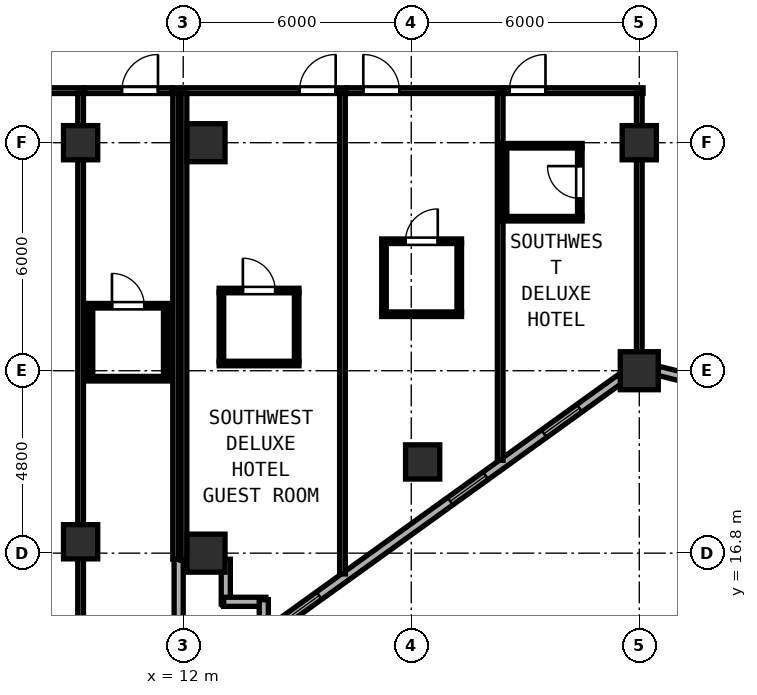
"""IFC4 building model, lengths in metres.
Left out: names, types, materials, properties, quantities, classifications, styles, units other than length and angle.
Written with IfcOpenShell. Run it as: python <this file> out.ifc"""

import sys

from ifc_helpers import new_model, si_unit, direction, frame, frame_2d, origin, origin_2d, place, context, subcontext, project, spatial, rectangle, hollow_rectangle, extrude, element, fill, save


model = new_model("IFC4")
c1 = context("Model", 3, precision=1e-05, world=origin(), true_north=direction((0.0, 1.0)))
c2 = subcontext(c1, "Body", "Model", "MODEL_VIEW")
j1 = project(units=[si_unit("LENGTHUNIT", "METRE"), si_unit("PLANEANGLEUNIT", "RADIAN")], contexts=[c1])
p1 = place(None, origin())
s1 = spatial("IfcSite", under=j1, at=p1, CompositionType="ELEMENT")
p2 = place(p1, origin())
s2 = spatial("IfcBuilding", under=s1, at=p2, CompositionType="ELEMENT")
p3 = place(p2, frame((0.0, 0.0, 152.4)))
s3 = spatial("IfcBuildingStorey", under=s2, at=p3, CompositionType="ELEMENT", Elevation=152.4)
for number, where, z_axis, x_axis in (
    (1, (24.0, 21.6, 0.0), (0.0, 0.0, 1.0), (1.0, 0.0, 0.0)),
    (2, (12.6, 16.8, 0.0), (0.0, 0.0, 1.0), (1.0, 0.0, 0.0)),
    (3, (12.6, 27.6, 0.0), (0.0, 0.0, 1.0), (1.0, 0.0, 0.0)),
):
    element("IfcColumn", number, at=place(p3, frame(where, z_axis=z_axis, x_axis=x_axis)), inside=s3, PredefinedType="COLUMN", context=c2, shape_type="SweptSolid", body=[
        extrude(hollow_rectangle(XDim=1.0, YDim=1.0, WallThickness=0.038, at=origin_2d()), origin(), (0.0, 0.0, 1.0), 3.8),
    ])
for number, where, z_axis, x_axis in (
    (4, (24.0, 27.6, 0.0), (0.0, 0.0, 1.0), (1.0, 0.0, 0.0)),
    (5, (18.3, 19.2, 0.0), (0.0, 0.0, 1.0), (1.0, 0.0, 0.0)),
    (6, (9.3, 17.1, 0.0), (0.0, 0.0, 1.0), (1.0, 0.0, 0.0)),
    (7, (9.3, 27.6, 0.0), (0.0, 0.0, 1.0), (1.0, 0.0, 0.0)),
):
    element("IfcColumn", number, at=place(p3, frame(where, z_axis=z_axis, x_axis=x_axis)), inside=s3, PredefinedType="COLUMN", context=c2, shape_type="SweptSolid", body=[
        extrude(hollow_rectangle(XDim=0.9, YDim=0.9, WallThickness=0.034, at=origin_2d()), origin(), (0.0, 0.0, 1.0), 3.8),
    ])
p4 = place(p3, frame((13.12, 16.64, 0.0), z_axis=(0.0, 0.0, 1.0), x_axis=(0.0, -1.0, 0.0)))
e8 = element("IfcWall", 8, at=p4, inside=s3, PredefinedType="SOLIDWALL", context=c2, shape_type="SweptSolid", body=[
    extrude(rectangle(XDim=1.175, YDim=0.24, at=frame_2d((0.587, 0.0))), origin(), (0.0, 0.0, 1.0), 3.6),
])
p5 = place(p3, frame((13.065, 15.52, 0.0), z_axis=(0.0, 0.0, 1.0), x_axis=(1.0, 0.0, 0.0)))
e9 = element("IfcWall", 9, at=p5, inside=s3, PredefinedType="SOLIDWALL", context=c2, shape_type="SweptSolid", body=[
    extrude(rectangle(XDim=1.11, YDim=0.24, at=frame_2d((0.555, 0.0))), origin(), (0.0, 0.0, 1.0), 3.6),
])
p6 = place(p3, frame((14.12, 15.575, 0.0), z_axis=(0.0, 0.0, 1.0), x_axis=(0.0, -1.0, 0.0)))
e10 = element("IfcWall", 10, at=p6, inside=s3, PredefinedType="SOLIDWALL", context=c2, shape_type="SweptSolid", body=[
    extrude(rectangle(XDim=0.996, YDim=0.24, at=frame_2d((0.498, 0.0))), origin(), (0.0, 0.0, 1.0), 3.6),
])
p7 = place(p3, frame((14.075, 14.602, 0.0), z_axis=(0.0, 0.0, 1.0), x_axis=(0.811543504691, 0.584291998913, 0.0)))
e11 = element("IfcWall", 11, at=p7, inside=s3, PredefinedType="SOLIDWALL", context=c2, shape_type="SweptSolid", body=[
    extrude(rectangle(XDim=11.623, YDim=0.24, at=frame_2d((5.812, 0.0))), origin(), (0.0, 0.0, 1.0), 3.145),
])
p8 = place(p7, frame((0.7, 0.0, 0.85)))
e12 = element("IfcOpeningElement", 12, at=p8, cuts=e11, PredefinedType="OPENING", context=c2, shape_type="SweptSolid", body=[
    extrude(rectangle(XDim=1.15, YDim=1.8, at=frame_2d((0.575, 0.9))), frame((0.0, 0.13, 0.0), z_axis=(0.0, -1.0, 0.0), x_axis=(1.0, 0.0, 0.0)), (0.0, 0.0, 1.0), 0.26),
])
p9 = place(p7, frame((6.1, 0.0, 0.85)))
e13 = element("IfcOpeningElement", 13, at=p9, cuts=e11, PredefinedType="OPENING", context=c2, shape_type="SweptSolid", body=[
    extrude(rectangle(XDim=1.15, YDim=1.8, at=frame_2d((0.575, 0.9))), frame((0.0, 0.13, 0.0), z_axis=(0.0, -1.0, 0.0), x_axis=(1.0, 0.0, 0.0)), (0.0, 0.0, 1.0), 0.26),
])
p10 = place(p7, frame((9.141, 0.0, 0.85)))
e14 = element("IfcOpeningElement", 14, at=p10, cuts=e11, PredefinedType="OPENING", context=c2, shape_type="SweptSolid", body=[
    extrude(rectangle(XDim=1.15, YDim=1.8, at=frame_2d((0.575, 0.9))), frame((0.0, 0.13, 0.0), z_axis=(0.0, -1.0, 0.0), x_axis=(1.0, 0.0, 0.0)), (0.0, 0.0, 1.0), 0.26),
])
p11 = place(p3, frame((24.492, 21.601, 0.0), z_axis=(0.0, 0.0, 1.0), x_axis=(0.970145683738, -0.242522890311, 0.0)))
e15 = element("IfcWall", 15, at=p11, inside=s3, PredefinedType="SOLIDWALL", context=c2, shape_type="SweptSolid", body=[
    extrude(rectangle(XDim=4.511, YDim=0.24, at=frame_2d((2.255, 0.0))), origin(), (0.0, 0.0, 1.0), 3.145),
])
p12 = place(p11, frame((0.7, 0.0, 0.85)))
e16 = element("IfcOpeningElement", 16, at=p12, cuts=e15, PredefinedType="OPENING", context=c2, shape_type="SweptSolid", body=[
    extrude(rectangle(XDim=1.15, YDim=1.8, at=frame_2d((0.575, 0.9))), frame((0.0, 0.13, 0.0), z_axis=(0.0, -1.0, 0.0), x_axis=(1.0, 0.0, 0.0)), (0.0, 0.0, 1.0), 0.26),
])
p13 = place(p3, frame((11.88, 14.397, 0.0), z_axis=(0.0, 0.0, 1.0), x_axis=(0.0, 1.0, 0.0)))
e17 = element("IfcWall", 17, at=p13, inside=s3, PredefinedType="SOLIDWALL", context=c2, shape_type="SweptSolid", body=[
    extrude(rectangle(XDim=2.243, YDim=0.24, at=frame_2d((1.121, 0.0))), origin(), (0.0, 0.0, 1.0), 3.6),
])
p14 = place(p3, frame((11.7, 28.97, 0.0), z_axis=(0.0, 0.0, 1.0), x_axis=(1.0, 0.0, 0.0)))
e18 = element("IfcWall", 18, at=p14, inside=s3, PredefinedType="PARTITIONING", context=c2, shape_type="SweptSolid", body=[
    extrude(rectangle(XDim=4.59, YDim=0.15, at=frame_2d((2.295, 0.0))), origin(), (0.0, 0.0, 1.0), 3.6),
])
p15 = place(p14, frame((4.311, 0.0, 0.0), z_axis=(0.0, 0.0, 1.0), x_axis=(-1.0, 0.0, 0.0)))
e19 = element("IfcOpeningElement", 19, at=p15, cuts=e18, PredefinedType="OPENING", context=c2, shape_type="SweptSolid", body=[
    extrude(rectangle(XDim=0.95, YDim=2.15, at=frame_2d((0.475, 1.075))), frame((0.0, 0.085, 0.0), z_axis=(0.0, -1.0, 0.0), x_axis=(1.0, 0.0, 0.0)), (0.0, 0.0, 1.0), 0.17),
])
p16 = place(p3, frame((11.8, 16.642, 0.0), z_axis=(0.0, 0.0, 1.0), x_axis=(0.0, 1.0, 0.0)))
e20 = element("IfcWall", 20, at=p16, inside=s3, PredefinedType="PARTITIONING", context=c2, shape_type="SweptSolid", body=[
    extrude(rectangle(XDim=12.268, YDim=0.15, at=frame_2d((6.134, 0.0))), origin(), (0.0, 0.0, 1.0), 3.6),
])
p17 = place(p3, frame((16.19, 16.254, 0.0), z_axis=(0.0, 0.0, 1.0), x_axis=(0.0, 1.0, 0.0)))
e21 = element("IfcWall", 21, at=p17, inside=s3, PredefinedType="PARTITIONING", context=c2, shape_type="SweptSolid", body=[
    extrude(rectangle(XDim=12.656, YDim=0.15, at=frame_2d((6.328, 0.0))), origin(), (0.0, 0.0, 1.0), 3.6),
])
p18 = place(p3, frame((12.945, 23.71, 0.0), z_axis=(0.0, 0.0, 1.0), x_axis=(1.0, 0.0, 0.0)))
e22 = element("IfcWall", 22, at=p18, inside=s3, PredefinedType="PARTITIONING", context=c2, shape_type="SweptSolid", body=[
    extrude(rectangle(XDim=2.1, YDim=0.12, at=frame_2d((1.05, 0.0))), origin(), (0.0, 0.0, 1.0), 3.6),
])
p19 = place(p18, frame((1.475, 0.0, 0.0), z_axis=(0.0, 0.0, 1.0), x_axis=(-1.0, 0.0, 0.0)))
e23 = element("IfcOpeningElement", 23, at=p19, cuts=e22, PredefinedType="OPENING", context=c2, shape_type="SweptSolid", body=[
    extrude(rectangle(XDim=0.85, YDim=2.1, at=frame_2d((0.425, 1.05))), frame((0.0, 0.07, 0.0), z_axis=(0.0, -1.0, 0.0), x_axis=(1.0, 0.0, 0.0)), (0.0, 0.0, 1.0), 0.14),
])
p20 = place(p3, frame((12.945, 21.79, 0.0), z_axis=(0.0, 0.0, 1.0), x_axis=(1.0, 0.0, 0.0)))
e24 = element("IfcWall", 24, at=p20, inside=s3, PredefinedType="PARTITIONING", context=c2, shape_type="SweptSolid", body=[
    extrude(rectangle(XDim=2.1, YDim=0.12, at=frame_2d((1.05, 0.0))), origin(), (0.0, 0.0, 1.0), 3.6),
])
for number, where, z_axis, x_axis in (
    (25, (13.005, 21.835, 0.0), (0.0, 0.0, 1.0), (0.0, 1.0, 0.0)),
    (26, (14.985, 21.835, 0.0), (0.0, 0.0, 1.0), (0.0, 1.0, 0.0)),
):
    element("IfcWall", number, at=place(p3, frame(where, z_axis=z_axis, x_axis=x_axis)), inside=s3, PredefinedType="PARTITIONING", context=c2, shape_type="SweptSolid", body=[
        extrude(rectangle(XDim=1.83, YDim=0.12, at=frame_2d((0.915, 0.0))), origin(), (0.0, 0.0, 1.0), 3.6),
    ])
p21 = place(p3, frame((16.292, 28.97, 0.0), z_axis=(0.0, 0.0, 1.0), x_axis=(1.0, 0.0, 0.0)))
e27 = element("IfcWall", 27, at=p21, inside=s3, PredefinedType="PARTITIONING", context=c2, shape_type="SweptSolid", body=[
    extrude(rectangle(XDim=4.148, YDim=0.15, at=frame_2d((2.074, 0.0))), origin(), (0.0, 0.0, 1.0), 3.6),
])
p22 = place(p21, frame((1.396, 0.0, 0.0), z_axis=(0.0, 0.0, 1.0), x_axis=(-1.0, 0.0, 0.0)))
e28 = element("IfcOpeningElement", 28, at=p22, cuts=e27, PredefinedType="OPENING", context=c2, shape_type="SweptSolid", body=[
    extrude(rectangle(XDim=0.95, YDim=2.15, at=frame_2d((0.475, 1.075))), frame((0.0, 0.085, 0.0), z_axis=(0.0, -1.0, 0.0), x_axis=(1.0, 0.0, 0.0)), (0.0, 0.0, 1.0), 0.17),
])
p23 = place(p3, frame((20.34, 19.242, 0.0), z_axis=(0.0, 0.0, 1.0), x_axis=(0.0, 1.0, 0.0)))
e29 = element("IfcWall", 29, at=p23, inside=s3, PredefinedType="PARTITIONING", context=c2, shape_type="SweptSolid", body=[
    extrude(rectangle(XDim=9.668, YDim=0.15, at=frame_2d((4.834, 0.0))), origin(), (0.0, 0.0, 1.0), 3.6),
])
p24 = place(p3, frame((17.223, 25.007, 0.0), z_axis=(0.0, 0.0, 1.0), x_axis=(1.0, 0.0, 0.0)))
e30 = element("IfcWall", 30, at=p24, inside=s3, PredefinedType="PARTITIONING", context=c2, shape_type="SweptSolid", body=[
    extrude(rectangle(XDim=2.1, YDim=0.12, at=frame_2d((1.05, 0.0))), origin(), (0.0, 0.0, 1.0), 3.6),
])
p25 = place(p24, frame((1.475, 0.0, 0.0), z_axis=(0.0, 0.0, 1.0), x_axis=(-1.0, 0.0, 0.0)))
e31 = element("IfcOpeningElement", 31, at=p25, cuts=e30, PredefinedType="OPENING", context=c2, shape_type="SweptSolid", body=[
    extrude(rectangle(XDim=0.85, YDim=2.1, at=frame_2d((0.425, 1.05))), frame((0.0, 0.07, 0.0), z_axis=(0.0, -1.0, 0.0), x_axis=(1.0, 0.0, 0.0)), (0.0, 0.0, 1.0), 0.14),
])
p26 = place(p3, frame((17.223, 23.087, 0.0), z_axis=(0.0, 0.0, 1.0), x_axis=(1.0, 0.0, 0.0)))
e32 = element("IfcWall", 32, at=p26, inside=s3, PredefinedType="PARTITIONING", context=c2, shape_type="SweptSolid", body=[
    extrude(rectangle(XDim=2.1, YDim=0.12, at=frame_2d((1.05, 0.0))), origin(), (0.0, 0.0, 1.0), 3.6),
])
for number, where, z_axis, x_axis in (
    (33, (17.283, 23.132, 0.0), (0.0, 0.0, 1.0), (0.0, 1.0, 0.0)),
    (34, (19.263, 23.132, 0.0), (0.0, 0.0, 1.0), (0.0, 1.0, 0.0)),
):
    element("IfcWall", number, at=place(p3, frame(where, z_axis=z_axis, x_axis=x_axis)), inside=s3, PredefinedType="PARTITIONING", context=c2, shape_type="SweptSolid", body=[
        extrude(rectangle(XDim=1.83, YDim=0.12, at=frame_2d((0.915, 0.0))), origin(), (0.0, 0.0, 1.0), 3.6),
    ])
p27 = place(p3, frame((20.442, 28.97, 0.0), z_axis=(0.0, 0.0, 1.0), x_axis=(1.0, 0.0, 0.0)))
e35 = element("IfcWall", 35, at=p27, inside=s3, PredefinedType="PARTITIONING", context=c2, shape_type="SweptSolid", body=[
    extrude(rectangle(XDim=3.658, YDim=0.15, at=frame_2d((1.829, 0.0))), origin(), (0.0, 0.0, 1.0), 3.6),
])
p28 = place(p27, frame((1.09, 0.0, 0.0), z_axis=(0.0, 0.0, 1.0), x_axis=(-1.0, 0.0, 0.0)))
e36 = element("IfcOpeningElement", 36, at=p28, cuts=e35, PredefinedType="OPENING", context=c2, shape_type="SweptSolid", body=[
    extrude(rectangle(XDim=0.95, YDim=2.15, at=frame_2d((0.475, 1.075))), frame((0.0, 0.085, 0.0), z_axis=(0.0, -1.0, 0.0), x_axis=(1.0, 0.0, 0.0)), (0.0, 0.0, 1.0), 0.17),
])
p29 = place(p3, frame((24.0, 21.819, 0.0), z_axis=(0.0, 0.0, 1.0), x_axis=(0.0, 1.0, 0.0)))
e37 = element("IfcWall", 37, at=p29, inside=s3, PredefinedType="PARTITIONING", context=c2, shape_type="SweptSolid", body=[
    extrude(rectangle(XDim=7.091, YDim=0.15, at=frame_2d((3.546, 0.0))), origin(), (0.0, 0.0, 1.0), 3.145),
])
p30 = place(p3, frame((20.4, 27.52, 0.0), z_axis=(0.0, 0.0, 1.0), x_axis=(1.0, 0.0, 0.0)))
e38 = element("IfcWall", 38, at=p30, inside=s3, PredefinedType="PARTITIONING", context=c2, shape_type="SweptSolid", body=[
    extrude(rectangle(XDim=2.095, YDim=0.12, at=frame_2d((1.048, 0.0))), origin(), (0.0, 0.0, 1.0), 3.145),
])
p31 = place(p3, frame((20.4, 25.6, 0.0), z_axis=(0.0, 0.0, 1.0), x_axis=(1.0, 0.0, 0.0)))
e39 = element("IfcWall", 39, at=p31, inside=s3, PredefinedType="PARTITIONING", context=c2, shape_type="SweptSolid", body=[
    extrude(rectangle(XDim=2.095, YDim=0.12, at=frame_2d((1.048, 0.0))), origin(), (0.0, 0.0, 1.0), 3.6),
])
p32 = place(p3, frame((20.455, 25.645, 0.0), z_axis=(0.0, 0.0, 1.0), x_axis=(0.0, 1.0, 0.0)))
e40 = element("IfcWall", 40, at=p32, inside=s3, PredefinedType="PARTITIONING", context=c2, shape_type="SweptSolid", body=[
    extrude(rectangle(XDim=1.83, YDim=0.12, at=frame_2d((0.915, 0.0))), origin(), (0.0, 0.0, 1.0), 3.6),
])
p33 = place(p3, frame((22.435, 25.645, 0.0), z_axis=(0.0, 0.0, 1.0), x_axis=(0.0, 1.0, 0.0)))
e41 = element("IfcWall", 41, at=p33, inside=s3, PredefinedType="PARTITIONING", context=c2, shape_type="SweptSolid", body=[
    extrude(rectangle(XDim=1.83, YDim=0.12, at=frame_2d((0.915, 0.0))), origin(), (0.0, 0.0, 1.0), 3.6),
])
p34 = place(p33, frame((0.49, 0.0, 0.0)))
e42 = element("IfcOpeningElement", 42, at=p34, cuts=e41, PredefinedType="OPENING", context=c2, shape_type="SweptSolid", body=[
    extrude(rectangle(XDim=0.85, YDim=2.1, at=frame_2d((0.425, 1.05))), frame((0.0, 0.07, 0.0), z_axis=(0.0, -1.0, 0.0), x_axis=(1.0, 0.0, 0.0)), (0.0, 0.0, 1.0), 0.14),
])
p35 = place(p3, frame((1.661, 28.97, 0.0), z_axis=(0.0, 0.0, 1.0), x_axis=(1.0, 0.0, 0.0)))
e43 = element("IfcWall", 43, at=p35, inside=s3, PredefinedType="PARTITIONING", context=c2, shape_type="SweptSolid", body=[
    extrude(rectangle(XDim=7.739, YDim=0.15, at=frame_2d((3.87, 0.0))), origin(), (0.0, 0.0, 1.0), 3.6),
])
p36 = place(p35, frame((6.434, 0.0, 0.0), z_axis=(0.0, 0.0, 1.0), x_axis=(-1.0, 0.0, 0.0)))
e44 = element("IfcOpeningElement", 44, at=p36, cuts=e43, PredefinedType="OPENING", context=c2, shape_type="SweptSolid", body=[
    extrude(rectangle(XDim=0.95, YDim=2.18, at=frame_2d((0.475, 1.09))), frame((0.0, 0.085, 0.0), z_axis=(0.0, -1.0, 0.0), x_axis=(1.0, 0.0, 0.0)), (0.0, 0.0, 1.0), 0.17),
])
p37 = place(p3, frame((9.3, 12.188, 0.0), z_axis=(0.0, 0.0, 1.0), x_axis=(0.0, 1.0, 0.0)))
e45 = element("IfcWall", 45, at=p37, inside=s3, PredefinedType="PARTITIONING", context=c2, shape_type="SweptSolid", body=[
    extrude(rectangle(XDim=16.722, YDim=0.15, at=frame_2d((8.361, 0.0))), origin(), (0.0, 0.0, 1.0), 3.6),
])
p38 = place(p3, frame((9.402, 28.97, 0.0), z_axis=(0.0, 0.0, 1.0), x_axis=(1.0, 0.0, 0.0)))
e46 = element("IfcWall", 46, at=p38, inside=s3, PredefinedType="PARTITIONING", context=c2, shape_type="SweptSolid", body=[
    extrude(rectangle(XDim=2.296, YDim=0.15, at=frame_2d((1.148, 0.0))), origin(), (0.0, 0.0, 1.0), 3.6),
])
p39 = place(p38, frame((1.934, 0.0, 0.0), z_axis=(0.0, 0.0, 1.0), x_axis=(-1.0, 0.0, 0.0)))
e47 = element("IfcOpeningElement", 47, at=p39, cuts=e46, PredefinedType="OPENING", context=c2, shape_type="SweptSolid", body=[
    extrude(rectangle(XDim=0.95, YDim=2.15, at=frame_2d((0.475, 1.075))), frame((0.0, 0.085, 0.0), z_axis=(0.0, -1.0, 0.0), x_axis=(1.0, 0.0, 0.0)), (0.0, 0.0, 1.0), 0.17),
])
p40 = place(p3, frame((12.02, 16.612, 0.0), z_axis=(0.0, 0.0, 1.0), x_axis=(0.0, 1.0, 0.0)))
e48 = element("IfcWall", 48, at=p40, inside=s3, PredefinedType="PARTITIONING", context=c2, shape_type="SweptSolid", body=[
    extrude(rectangle(XDim=12.298, YDim=0.15, at=frame_2d((6.149, 0.0))), origin(), (0.0, 0.0, 1.0), 3.6),
])
p41 = place(p3, frame((9.5, 23.31, 0.0), z_axis=(0.0, 0.0, 1.0), x_axis=(1.0, 0.0, 0.0)))
e49 = element("IfcWall", 49, at=p41, inside=s3, PredefinedType="PARTITIONING", context=c2, shape_type="SweptSolid", body=[
    extrude(rectangle(XDim=2.1, YDim=0.12, at=frame_2d((1.05, 0.0))), origin(), (0.0, 0.0, 1.0), 3.6),
])
p42 = place(p41, frame((1.475, 0.0, 0.0), z_axis=(0.0, 0.0, 1.0), x_axis=(-1.0, 0.0, 0.0)))
e50 = element("IfcOpeningElement", 50, at=p42, cuts=e49, PredefinedType="OPENING", context=c2, shape_type="SweptSolid", body=[
    extrude(rectangle(XDim=0.85, YDim=2.1, at=frame_2d((0.425, 1.05))), frame((0.0, 0.07, 0.0), z_axis=(0.0, -1.0, 0.0), x_axis=(1.0, 0.0, 0.0)), (0.0, 0.0, 1.0), 0.14),
])
p43 = place(p3, frame((9.5, 21.39, 0.0), z_axis=(0.0, 0.0, 1.0), x_axis=(1.0, 0.0, 0.0)))
e51 = element("IfcWall", 51, at=p43, inside=s3, PredefinedType="PARTITIONING", context=c2, shape_type="SweptSolid", body=[
    extrude(rectangle(XDim=2.1, YDim=0.12, at=frame_2d((1.05, 0.0))), origin(), (0.0, 0.0, 1.0), 3.6),
])
for number, where, z_axis, x_axis in (
    (52, (9.56, 21.435, 0.0), (0.0, 0.0, 1.0), (0.0, 1.0, 0.0)),
    (53, (11.54, 21.435, 0.0), (0.0, 0.0, 1.0), (0.0, 1.0, 0.0)),
):
    element("IfcWall", number, at=place(p3, frame(where, z_axis=z_axis, x_axis=x_axis)), inside=s3, PredefinedType="PARTITIONING", context=c2, shape_type="SweptSolid", body=[
        extrude(rectangle(XDim=1.83, YDim=0.12, at=frame_2d((0.915, 0.0))), origin(), (0.0, 0.0, 1.0), 3.6),
    ])
p44 = place(p8, origin())
e54 = element("IfcWindow", 54, at=p44, inside=s3, PartitioningType="SINGLE_PANEL", PredefinedType="WINDOW", context=c2, shape_type="SweptSolid", body=[
    extrude(rectangle(XDim=1.15, YDim=1.8, at=frame_2d((0.575, 0.9))), frame((0.0, 0.03, 0.0), z_axis=(0.0, -1.0, 0.0), x_axis=(1.0, 0.0, 0.0)), (0.0, 0.0, 1.0), 0.06),
])
fill(e12, e54)
p45 = place(p9, origin())
e55 = element("IfcWindow", 55, at=p45, inside=s3, PartitioningType="SINGLE_PANEL", PredefinedType="WINDOW", context=c2, shape_type="SweptSolid", body=[
    extrude(rectangle(XDim=1.15, YDim=1.8, at=frame_2d((0.575, 0.9))), frame((0.0, 0.03, 0.0), z_axis=(0.0, -1.0, 0.0), x_axis=(1.0, 0.0, 0.0)), (0.0, 0.0, 1.0), 0.06),
])
fill(e13, e55)
p46 = place(p15, origin())
e56 = element("IfcDoor", 56, at=p46, inside=s3, OperationType="SINGLE_SWING_LEFT", PredefinedType="DOOR", context=c2, shape_type="SweptSolid", body=[
    extrude(rectangle(XDim=0.95, YDim=2.15, at=frame_2d((0.475, 1.075))), frame((0.0, 0.025, 0.0), z_axis=(0.0, -1.0, 0.0), x_axis=(1.0, 0.0, 0.0)), (0.0, 0.0, 1.0), 0.05),
])
fill(e19, e56)
p47 = place(p19, origin())
e57 = element("IfcDoor", 57, at=p47, inside=s3, OperationType="SINGLE_SWING_RIGHT", PredefinedType="DOOR", context=c2, shape_type="SweptSolid", body=[
    extrude(rectangle(XDim=0.85, YDim=2.1, at=frame_2d((0.425, 1.05))), frame((0.0, 0.025, 0.0), z_axis=(0.0, -1.0, 0.0), x_axis=(1.0, 0.0, 0.0)), (0.0, 0.0, 1.0), 0.05),
])
fill(e23, e57)
p48 = place(p22, origin())
e58 = element("IfcDoor", 58, at=p48, inside=s3, OperationType="SINGLE_SWING_RIGHT", PredefinedType="DOOR", context=c2, shape_type="SweptSolid", body=[
    extrude(rectangle(XDim=0.95, YDim=2.15, at=frame_2d((0.475, 1.075))), frame((0.0, 0.025, 0.0), z_axis=(0.0, -1.0, 0.0), x_axis=(1.0, 0.0, 0.0)), (0.0, 0.0, 1.0), 0.05),
])
fill(e28, e58)
p49 = place(p25, origin())
e59 = element("IfcDoor", 59, at=p49, inside=s3, OperationType="SINGLE_SWING_LEFT", PredefinedType="DOOR", context=c2, shape_type="SweptSolid", body=[
    extrude(rectangle(XDim=0.85, YDim=2.1, at=frame_2d((0.425, 1.05))), frame((0.0, 0.025, 0.0), z_axis=(0.0, -1.0, 0.0), x_axis=(1.0, 0.0, 0.0)), (0.0, 0.0, 1.0), 0.05),
])
fill(e31, e59)
p50 = place(p28, origin())
e60 = element("IfcDoor", 60, at=p50, inside=s3, OperationType="SINGLE_SWING_LEFT", PredefinedType="DOOR", context=c2, shape_type="SweptSolid", body=[
    extrude(rectangle(XDim=0.95, YDim=2.15, at=frame_2d((0.475, 1.075))), frame((0.0, 0.025, 0.0), z_axis=(0.0, -1.0, 0.0), x_axis=(1.0, 0.0, 0.0)), (0.0, 0.0, 1.0), 0.05),
])
fill(e36, e60)
p51 = place(p34, origin())
e61 = element("IfcDoor", 61, at=p51, inside=s3, OperationType="SINGLE_SWING_RIGHT", PredefinedType="DOOR", context=c2, shape_type="SweptSolid", body=[
    extrude(rectangle(XDim=0.85, YDim=2.1, at=frame_2d((0.425, 1.05))), frame((0.0, 0.025, 0.0), z_axis=(0.0, -1.0, 0.0), x_axis=(1.0, 0.0, 0.0)), (0.0, 0.0, 1.0), 0.05),
])
fill(e42, e61)
p52 = place(p39, origin())
e62 = element("IfcDoor", 62, at=p52, inside=s3, OperationType="SINGLE_SWING_LEFT", PredefinedType="DOOR", context=c2, shape_type="SweptSolid", body=[
    extrude(rectangle(XDim=0.95, YDim=2.15, at=frame_2d((0.475, 1.075))), frame((0.0, 0.025, 0.0), z_axis=(0.0, -1.0, 0.0), x_axis=(1.0, 0.0, 0.0)), (0.0, 0.0, 1.0), 0.05),
])
fill(e47, e62)
p53 = place(p42, origin())
e63 = element("IfcDoor", 63, at=p53, inside=s3, OperationType="SINGLE_SWING_RIGHT", PredefinedType="DOOR", context=c2, shape_type="SweptSolid", body=[
    extrude(rectangle(XDim=0.85, YDim=2.1, at=frame_2d((0.425, 1.05))), frame((0.0, 0.025, 0.0), z_axis=(0.0, -1.0, 0.0), x_axis=(1.0, 0.0, 0.0)), (0.0, 0.0, 1.0), 0.05),
])
fill(e50, e63)
p54 = place(p10, origin())
e64 = element("IfcWindow", 64, at=p54, inside=s3, PartitioningType="SINGLE_PANEL", PredefinedType="WINDOW", context=c2, shape_type="SweptSolid", body=[
    extrude(rectangle(XDim=1.15, YDim=1.8, at=frame_2d((0.575, 0.9))), frame((0.0, 0.03, 0.0), z_axis=(0.0, -1.0, 0.0), x_axis=(1.0, 0.0, 0.0)), (0.0, 0.0, 1.0), 0.06),
])
fill(e14, e64)
save(model, sys.argv[1])
